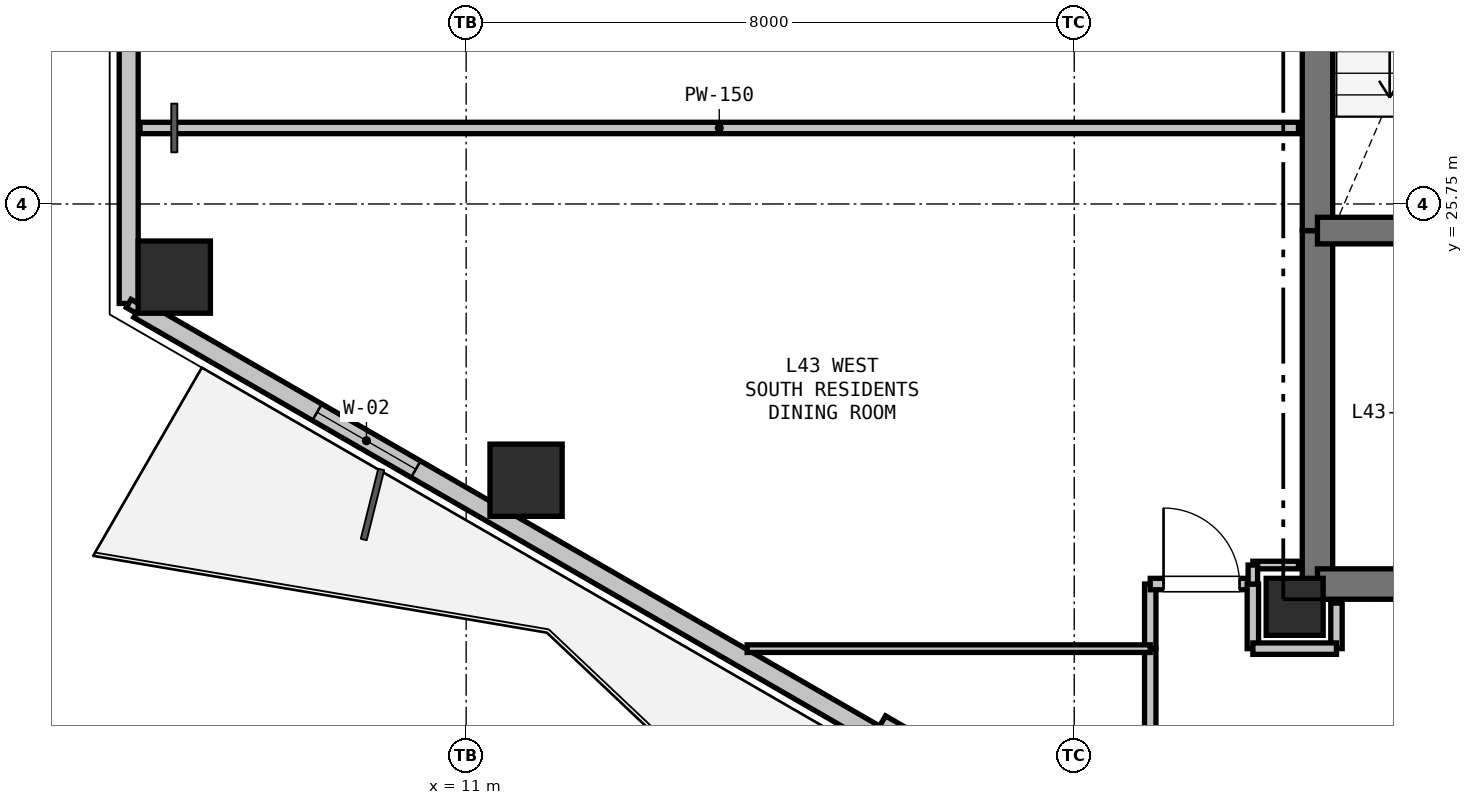
"""IFC4 building model, lengths in metres.
Left out: names, types, materials, properties, quantities, classifications, styles, units other than length and angle.
Written with IfcOpenShell. Run it as: python <this file> out.ifc"""

import sys

from ifc_helpers import new_model, si_unit, direction, frame, frame_2d, origin, origin_2d, place, context, subcontext, project, spatial, rectangle, hollow_rectangle, extrude, element, fill, save


model = new_model("IFC4")
c1 = context("Model", 3, precision=1e-05, world=origin(), true_north=direction((0.0, 1.0)))
c2 = subcontext(c1, "Body", "Model", "MODEL_VIEW")
j1 = project(units=[si_unit("LENGTHUNIT", "METRE"), si_unit("PLANEANGLEUNIT", "RADIAN")], contexts=[c1])
p1 = place(None, origin())
s1 = spatial("IfcSite", under=j1, at=p1, CompositionType="ELEMENT")
p2 = place(p1, origin())
s2 = spatial("IfcBuilding", under=s1, at=p2, CompositionType="ELEMENT")
p3 = place(p2, frame((0.0, 0.0, 154.2)))
s3 = spatial("IfcBuildingStorey", under=s2, at=p3, CompositionType="ELEMENT", Elevation=154.2)
p4 = place(p3, frame((21.9, 20.45, 0.0), z_axis=(0.0, 0.0, 1.0), x_axis=(1.0, 0.0, 0.0)))
e1 = element("IfcColumn", 1, at=p4, inside=s3, PredefinedType="COLUMN", context=c2, shape_type="SweptSolid", body=[
    extrude(rectangle(XDim=0.75, YDim=0.75, at=origin_2d()), origin(), (0.0, 0.0, 1.0), 3.3),
])
for number, where, z_axis, x_axis in (
    (2, (11.788, 22.116, 0.0), (0.0, 0.0, 1.0), (1.0, 0.0, 0.0)),
    (3, (7.16, 24.788, 0.0), (0.0, 0.0, 1.0), (1.0, 0.0, 0.0)),
):
    element("IfcColumn", number, at=place(p3, frame(where, z_axis=z_axis, x_axis=x_axis)), inside=s3, PredefinedType="COLUMN", context=c2, shape_type="SweptSolid", body=[
        extrude(hollow_rectangle(XDim=0.95, YDim=0.95, WallThickness=0.028, at=origin_2d()), origin(), (0.0, 0.0, 1.0), 3.3),
    ])
p5 = place(p3, frame((6.56, 24.441, 0.0), z_axis=(0.0, 0.0, 1.0), x_axis=(0.0, 1.0, 0.0)))
e4 = element("IfcWall", 4, at=p5, inside=s3, PredefinedType="SOLIDWALL", context=c2, shape_type="SweptSolid", body=[
    extrude(rectangle(XDim=4.617, YDim=0.25, at=frame_2d((2.309, 0.0))), origin(), (0.0, 0.0, 1.0), 2.68),
])
p6 = place(p3, frame((16.378, 18.773, 0.0), z_axis=(0.0, 0.0, 1.0), x_axis=(-0.866027848477, 0.499995765644, 0.0)))
e5 = element("IfcWall", 5, at=p6, inside=s3, PredefinedType="SOLIDWALL", context=c2, shape_type="SweptSolid", body=[
    extrude(rectangle(XDim=11.186, YDim=0.25, at=frame_2d((5.593, 0.0))), origin(), (0.0, 0.0, 1.0), 2.68),
])
p7 = place(p6, frame((6.974, 0.0, 0.9)))
e6 = element("IfcOpeningElement", 6, at=p7, cuts=e5, PredefinedType="OPENING", context=c2, shape_type="SweptSolid", body=[
    extrude(rectangle(XDim=1.5, YDim=1.5, at=frame_2d((0.75, 0.75))), frame((0.0, 0.135, 0.0), z_axis=(0.0, -1.0, 0.0), x_axis=(1.0, 0.0, 0.0)), (0.0, 0.0, 1.0), 0.27),
])
p8 = place(p3, frame((17.94, 18.079, 0.0), z_axis=(0.0, 0.0, 1.0), x_axis=(-0.865989465428, 0.500062241894, 0.0)))
e7 = element("IfcWall", 7, at=p8, inside=s3, PredefinedType="PARAPET", context=c2, shape_type="SweptSolid", body=[
    extrude(rectangle(XDim=1.7, YDim=0.2, at=frame_2d((0.85, 0.0))), origin(), (0.0, 0.0, 1.0), 2.68),
])
p9 = place(p3, frame((22.2, 20.75, 0.0), z_axis=(0.0, 0.0, 1.0), x_axis=(0.0, 1.0, 0.0)))
e8 = element("IfcWall", 8, at=p9, inside=s3, PredefinedType="SHEAR", context=c2, shape_type="SweptSolid", body=[
    extrude(rectangle(XDim=4.65, YDim=0.4, at=frame_2d((2.325, 0.0))), origin(), (0.0, 0.0, 1.0), 3.06),
])
p10 = place(p3, frame((22.2, 25.4, 0.0), z_axis=(0.0, 0.0, 1.0), x_axis=(0.0, 1.0, 0.0)))
e9 = element("IfcWall", 9, at=p10, inside=s3, PredefinedType="SHEAR", context=c2, shape_type="SweptSolid", body=[
    extrude(rectangle(XDim=7.35, YDim=0.4, at=frame_2d((3.675, 0.0))), origin(), (0.0, 0.0, 1.0), 3.06),
])
p11 = place(p3, frame((25.65, 20.75, 0.0), z_axis=(0.0, 0.0, 1.0), x_axis=(-1.0, 0.0, 0.0)))
e10 = element("IfcWall", 10, at=p11, inside=s3, PredefinedType="SHEAR", context=c2, shape_type="SweptSolid", body=[
    extrude(rectangle(XDim=3.45, YDim=0.4, at=frame_2d((1.725, 0.0))), origin(), (0.0, 0.0, 1.0), 3.06),
])
p12 = place(p11, frame((0.65, 0.0, 0.0)))
e11 = element("IfcOpeningElement", 11, at=p12, cuts=e10, PredefinedType="OPENING", context=c2, shape_type="SweptSolid", body=[
    extrude(rectangle(XDim=1.15, YDim=2.15, at=frame_2d((0.575, 1.075))), frame((0.0, 0.21, 0.0), z_axis=(0.0, -1.0, 0.0), x_axis=(1.0, 0.0, 0.0)), (0.0, 0.0, 1.0), 0.42),
])
p13 = place(p3, frame((22.2, 25.4, 0.0), z_axis=(0.0, 0.0, 1.0), x_axis=(1.0, 0.0, 0.0)))
e12 = element("IfcWall", 12, at=p13, inside=s3, PredefinedType="SHEAR", context=c2, shape_type="SweptSolid", body=[
    extrude(rectangle(XDim=3.45, YDim=0.35, at=frame_2d((1.725, 0.0))), origin(), (0.0, 0.0, 1.0), 3.06),
])
p14 = place(p13, frame((1.15, 0.0, 0.0)))
e13 = element("IfcOpeningElement", 13, at=p14, cuts=e12, PredefinedType="OPENING", context=c2, shape_type="SweptSolid", body=[
    extrude(rectangle(XDim=1.15, YDim=2.15, at=frame_2d((0.575, 1.075))), frame((0.0, 0.185, 0.0), z_axis=(0.0, -1.0, 0.0), x_axis=(1.0, 0.0, 0.0)), (0.0, 0.0, 1.0), 0.37),
])
p15 = place(p3, frame((22.45, 19.9, 0.0), z_axis=(0.0, 0.0, 1.0), x_axis=(0.0, 1.0, 0.0)))
e14 = element("IfcWall", 14, at=p15, inside=s3, PredefinedType="PARTITIONING", context=c2, shape_type="SweptSolid", body=[
    extrude(rectangle(XDim=0.6, YDim=0.15, at=frame_2d((0.3, 0.0))), origin(), (0.0, 0.0, 1.0), 2.433),
])
p16 = place(p3, frame((20.0, 18.15, 0.0), z_axis=(0.0, 0.0, 1.0), x_axis=(0.0, 1.0, 0.0)))
e15 = element("IfcWall", 15, at=p16, inside=s3, PredefinedType="PARTITIONING", context=c2, shape_type="SweptSolid", body=[
    extrude(rectangle(XDim=1.75, YDim=0.15, at=frame_2d((0.875, 0.0))), origin(), (0.0, 0.0, 1.0), 3.06),
])
p17 = place(p3, frame((20.0, 19.9, 0.0), z_axis=(0.0, 0.0, 1.0), x_axis=(0.0, 1.0, 0.0)))
e16 = element("IfcWall", 16, at=p17, inside=s3, PredefinedType="PARTITIONING", context=c2, shape_type="SweptSolid", body=[
    extrude(rectangle(XDim=0.85, YDim=0.15, at=frame_2d((0.425, 0.0))), origin(), (0.0, 0.0, 1.0), 3.06),
])
p18 = place(p3, frame((20.0, 20.75, 0.0), z_axis=(0.0, 0.0, 1.0), x_axis=(1.0, 0.0, 0.0)))
e17 = element("IfcWall", 17, at=p18, inside=s3, PredefinedType="PARTITIONING", context=c2, shape_type="SweptSolid", body=[
    extrude(rectangle(XDim=1.35, YDim=0.15, at=frame_2d((0.675, 0.0))), origin(), (0.0, 0.0, 1.0), 2.433),
])
p19 = place(p18, frame((0.175, 0.0, 0.0)))
e18 = element("IfcOpeningElement", 18, at=p19, cuts=e17, PredefinedType="OPENING", context=c2, shape_type="SweptSolid", body=[
    extrude(rectangle(XDim=1.0, YDim=2.15, at=frame_2d((0.5, 1.075))), frame((0.0, 0.085, 0.0), z_axis=(0.0, -1.0, 0.0), x_axis=(1.0, 0.0, 0.0)), (0.0, 0.0, 1.0), 0.17),
])
p20 = place(p3, frame((21.35, 20.75, 0.0), z_axis=(0.0, 0.0, 1.0), x_axis=(0.0, -1.0, 0.0)))
e19 = element("IfcWall", 19, at=p20, inside=s3, PredefinedType="PARTITIONING", context=c2, shape_type="SweptSolid", body=[
    extrude(rectangle(XDim=0.85, YDim=0.15, at=frame_2d((0.425, 0.0))), origin(), (0.0, 0.0, 1.0), 2.433),
])
p21 = place(p3, frame((21.35, 19.9, 0.0), z_axis=(0.0, 0.0, 1.0), x_axis=(1.0, 0.0, 0.0)))
e20 = element("IfcWall", 20, at=p21, inside=s3, PredefinedType="PARTITIONING", context=c2, shape_type="SweptSolid", body=[
    extrude(rectangle(XDim=1.1, YDim=0.15, at=frame_2d((0.55, 0.0))), origin(), (0.0, 0.0, 1.0), 2.433),
])
p22 = place(p3, frame((6.709, 26.75, 0.0), z_axis=(0.0, 0.0, 1.0), x_axis=(1.0, 0.0, 0.0)))
e21 = element("IfcWall", 21, at=p22, inside=s3, PredefinedType="PARTITIONING", context=c2, shape_type="SweptSolid", body=[
    extrude(rectangle(XDim=15.241, YDim=0.15, at=frame_2d((7.62, 0.0))), origin(), (0.0, 0.0, 1.0), 2.585),
])
p23 = place(p3, frame((21.95, 21.0, 0.0), z_axis=(0.0, 0.0, 1.0), x_axis=(-1.0, 0.0, 0.0)))
e22 = element("IfcWall", 22, at=p23, inside=s3, PredefinedType="PARTITIONING", context=c2, shape_type="SweptSolid", body=[
    extrude(rectangle(XDim=0.6, YDim=0.1, at=frame_2d((0.3, 0.0))), origin(), (0.0, 0.0, 1.0), 2.585),
])
p24 = place(p3, frame((21.35, 21.0, 0.0), z_axis=(0.0, 0.0, 1.0), x_axis=(0.0, -1.0, 0.0)))
e23 = element("IfcWall", 23, at=p24, inside=s3, PredefinedType="PARTITIONING", context=c2, shape_type="SweptSolid", body=[
    extrude(rectangle(XDim=0.25, YDim=0.125, at=frame_2d((0.125, 0.0))), origin(), (0.0, 0.0, 1.0), 3.06),
])
p25 = place(p3, frame((20.0, 19.9, 0.0), z_axis=(0.0, 0.0, 1.0), x_axis=(-1.0, 0.0, 0.0)))
e24 = element("IfcWall", 24, at=p25, inside=s3, PredefinedType="PARTITIONING", context=c2, shape_type="SweptSolid", body=[
    extrude(rectangle(XDim=5.303, YDim=0.1, at=frame_2d((2.651, 0.0))), origin(), (0.0, 0.0, 1.0), 2.365),
])
p26 = place(p3, frame((6.69, 24.366, 0.0), z_axis=(0.0, 0.0, 1.0), x_axis=(-0.866131372301, 0.499816412211, 0.0)))
e25 = element("IfcWall", 25, at=p26, inside=s3, PredefinedType="PARTITIONING", context=c2, shape_type="SweptSolid", body=[
    extrude(rectangle(XDim=0.15, YDim=0.125, at=frame_2d((0.075, 0.0))), origin(), (0.0, 0.0, 1.0), 3.06),
])
p27 = place(p7, origin())
e26 = element("IfcWindow", 26, at=p27, inside=s3, PartitioningType="SINGLE_PANEL", PredefinedType="WINDOW", context=c2, shape_type="SweptSolid", body=[
    extrude(rectangle(XDim=1.5, YDim=1.5, at=frame_2d((0.75, 0.75))), frame((0.0, 0.03, 0.0), z_axis=(0.0, -1.0, 0.0), x_axis=(1.0, 0.0, 0.0)), (0.0, 0.0, 1.0), 0.06),
])
fill(e6, e26)
p28 = place(p19, origin())
e27 = element("IfcDoor", 27, at=p28, inside=s3, OperationType="SINGLE_SWING_LEFT", PredefinedType="DOOR", context=c2, shape_type="SweptSolid", body=[
    extrude(rectangle(XDim=1.0, YDim=2.15, at=frame_2d((0.5, 1.075))), frame((0.0, 0.025, 0.0), z_axis=(0.0, -1.0, 0.0), x_axis=(1.0, 0.0, 0.0)), (0.0, 0.0, 1.0), 0.05),
])
fill(e18, e27)
save(model, sys.argv[1])
